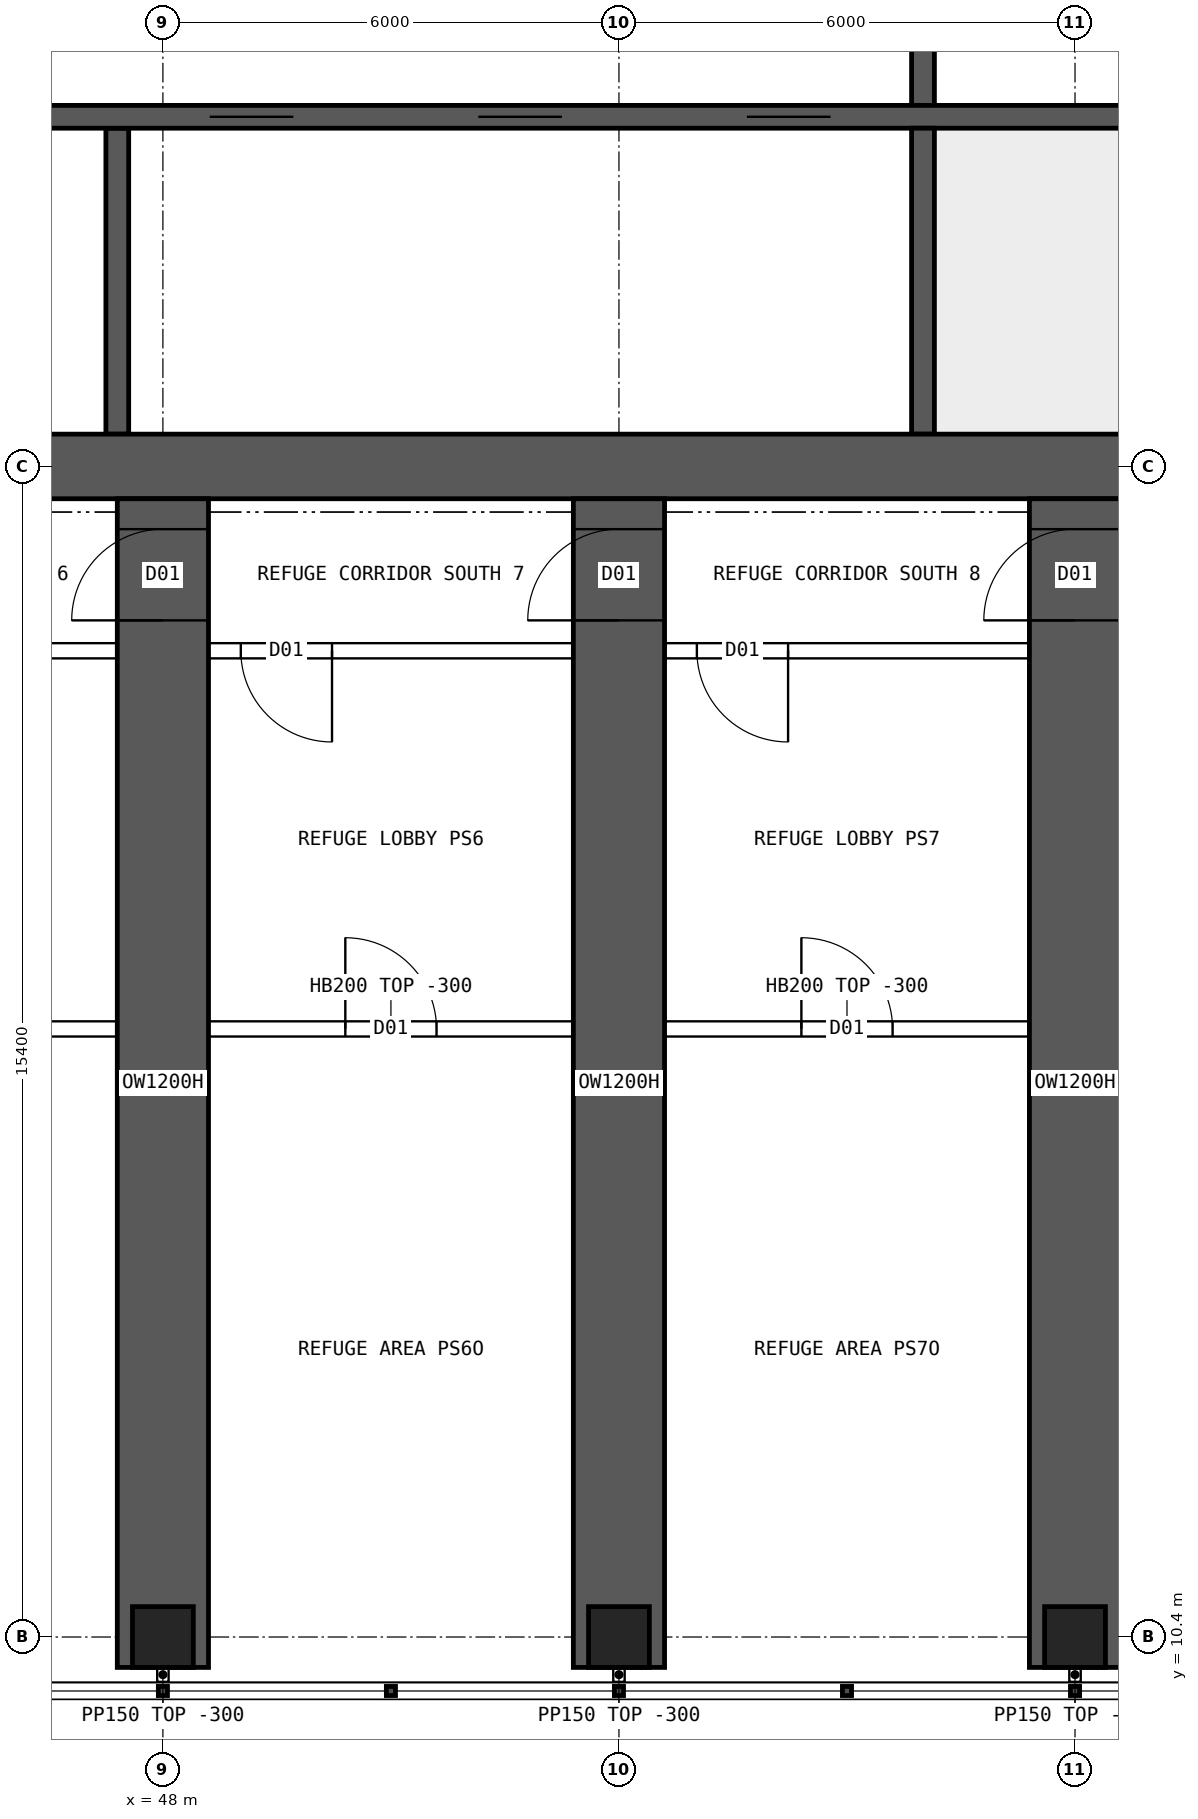
"""IFC4 building model, lengths in metres.
Left out: names, types, materials, properties, quantities, classifications, styles, units other than length and angle.
Written with IfcOpenShell. Run it as: python <this file> out.ifc"""

import sys

from ifc_helpers import new_model, si_unit, direction, frame, frame_2d, origin, origin_2d, place, context, subcontext, project, spatial, rectangle, hollow_rectangle, extrude, element, fill, save


model = new_model("IFC4")
c1 = context("Model", 3, precision=1e-05, world=origin(), true_north=direction((0.0, 1.0)))
c2 = subcontext(c1, "Body", "Model", "MODEL_VIEW")
j1 = project(units=[si_unit("LENGTHUNIT", "METRE"), si_unit("PLANEANGLEUNIT", "RADIAN")], contexts=[c1])
p1 = place(None, origin())
s1 = spatial("IfcSite", under=j1, at=p1, CompositionType="ELEMENT")
p2 = place(p1, origin())
s2 = spatial("IfcBuilding", under=s1, at=p2, CompositionType="ELEMENT")
p3 = place(p2, frame((0.0, 0.0, 201.1)))
s3 = spatial("IfcBuildingStorey", under=s2, at=p3, CompositionType="ELEMENT", Elevation=201.1)
for number, where, z_axis, x_axis in (
    (1, (48.0, 10.4, 0.0), (0.0, 0.0, 1.0), (1.0, 0.0, 0.0)),
    (2, (54.0, 10.4, 0.0), (0.0, 0.0, 1.0), (1.0, 0.0, 0.0)),
    (3, (60.0, 10.4, 0.0), (0.0, 0.0, 1.0), (1.0, 0.0, 0.0)),
):
    element("IfcColumn", number, at=place(p3, frame(where, z_axis=z_axis, x_axis=x_axis)), inside=s3, PredefinedType="COLUMN", context=c2, shape_type="SweptSolid", body=[
        extrude(hollow_rectangle(XDim=0.8, YDim=0.8, WallThickness=0.08, at=origin_2d()), origin(), (0.0, 0.0, 1.0), 7.2),
    ])
p4 = place(p3, frame((18.0, 25.8, 0.0), z_axis=(0.0, 0.0, 1.0), x_axis=(1.0, 0.0, 0.0)))
e4 = element("IfcWall", 4, at=p4, inside=s3, PredefinedType="SHEAR", context=c2, shape_type="SweptSolid", body=[
    extrude(rectangle(XDim=48.0, YDim=0.85, at=frame_2d((24.0, 0.0))), origin(), (0.0, 0.0, 1.0), 7.2),
])
p5 = place(p3, frame((18.425, 30.4, 0.0), z_axis=(0.0, 0.0, 1.0), x_axis=(1.0, 0.0, 0.0)))
e5 = element("IfcWall", 5, at=p5, inside=s3, PredefinedType="SHEAR", context=c2, shape_type="SweptSolid", body=[
    extrude(rectangle(XDim=47.15, YDim=0.3, at=frame_2d((23.575, 0.0))), origin(), (0.0, 0.0, 1.0), 7.2),
])
p6 = place(p5, frame((0.4, 0.0, 0.0)))
e6 = element("IfcOpeningElement", 6, at=p6, cuts=e5, PredefinedType="OPENING", context=c2, shape_type="SweptSolid", body=[
    extrude(rectangle(XDim=1.0, YDim=2.1, at=frame_2d((0.5, 1.05))), frame((0.0, 0.16, 0.0), z_axis=(0.0, -1.0, 0.0), x_axis=(1.0, 0.0, 0.0)), (0.0, 0.0, 1.0), 0.32),
])
p7 = place(p5, frame((45.75, 0.0, 0.0)))
e7 = element("IfcOpeningElement", 7, at=p7, cuts=e5, PredefinedType="OPENING", context=c2, shape_type="SweptSolid", body=[
    extrude(rectangle(XDim=1.0, YDim=2.1, at=frame_2d((0.5, 1.05))), frame((0.0, 0.16, 0.0), z_axis=(0.0, -1.0, 0.0), x_axis=(1.0, 0.0, 0.0)), (0.0, 0.0, 1.0), 0.32),
])
p8 = place(p5, frame((18.9, 0.0, 0.0)))
e8 = element("IfcOpeningElement", 8, at=p8, cuts=e5, PredefinedType="OPENING", context=c2, shape_type="SweptSolid", body=[
    extrude(rectangle(XDim=0.9, YDim=2.1, at=frame_2d((0.45, 1.05))), frame((0.0, 0.16, 0.0), z_axis=(0.0, -1.0, 0.0), x_axis=(1.0, 0.0, 0.0)), (0.0, 0.0, 1.0), 0.32),
])
p9 = place(p5, frame((30.192, 0.0, 0.0)))
e9 = element("IfcOpeningElement", 9, at=p9, cuts=e5, PredefinedType="OPENING", context=c2, shape_type="SweptSolid", body=[
    extrude(rectangle(XDim=1.1, YDim=2.1, at=frame_2d((0.55, 1.05))), frame((0.0, 0.16, 0.0), z_axis=(0.0, -1.0, 0.0), x_axis=(1.0, 0.0, 0.0)), (0.0, 0.0, 1.0), 0.32),
])
p10 = place(p5, frame((33.725, 0.0, 0.0)))
e10 = element("IfcOpeningElement", 10, at=p10, cuts=e5, PredefinedType="OPENING", context=c2, shape_type="SweptSolid", body=[
    extrude(rectangle(XDim=1.1, YDim=2.1, at=frame_2d((0.55, 1.05))), frame((0.0, 0.16, 0.0), z_axis=(0.0, -1.0, 0.0), x_axis=(1.0, 0.0, 0.0)), (0.0, 0.0, 1.0), 0.32),
])
p11 = place(p5, frame((37.258, 0.0, 0.0)))
e11 = element("IfcOpeningElement", 11, at=p11, cuts=e5, PredefinedType="OPENING", context=c2, shape_type="SweptSolid", body=[
    extrude(rectangle(XDim=1.1, YDim=2.1, at=frame_2d((0.55, 1.05))), frame((0.0, 0.16, 0.0), z_axis=(0.0, -1.0, 0.0), x_axis=(1.0, 0.0, 0.0)), (0.0, 0.0, 1.0), 0.32),
])
p12 = place(p3, frame((58.0, 26.225, 0.0), z_axis=(0.0, 0.0, 1.0), x_axis=(0.0, 1.0, 0.0)))
e12 = element("IfcWall", 12, at=p12, inside=s3, PredefinedType="SHEAR", context=c2, shape_type="SweptSolid", body=[
    extrude(rectangle(XDim=4.025, YDim=0.3, at=frame_2d((2.012, 0.0))), origin(), (0.0, 0.0, 1.0), 7.2),
])
p13 = place(p3, frame((58.0, 30.55, 0.0), z_axis=(0.0, 0.0, 1.0), x_axis=(0.0, 1.0, 0.0)))
e13 = element("IfcWall", 13, at=p13, inside=s3, PredefinedType="SHEAR", context=c2, shape_type="SweptSolid", body=[
    extrude(rectangle(XDim=3.9, YDim=0.3, at=frame_2d((1.95, 0.0))), origin(), (0.0, 0.0, 1.0), 7.2),
])
p14 = place(p13, frame((1.4, 0.0, 0.0)))
e14 = element("IfcOpeningElement", 14, at=p14, cuts=e13, PredefinedType="OPENING", context=c2, shape_type="SweptSolid", body=[
    extrude(rectangle(XDim=1.2, YDim=2.1, at=frame_2d((0.6, 1.05))), frame((0.0, 0.16, 0.0), z_axis=(0.0, -1.0, 0.0), x_axis=(1.0, 0.0, 0.0)), (0.0, 0.0, 1.0), 0.32),
])
p15 = place(p3, frame((47.4, 26.225, 0.0), z_axis=(0.0, 0.0, 1.0), x_axis=(0.0, 1.0, 0.0)))
e15 = element("IfcWall", 15, at=p15, inside=s3, PredefinedType="SHEAR", context=c2, shape_type="SweptSolid", body=[
    extrude(rectangle(XDim=4.025, YDim=0.3, at=frame_2d((2.012, 0.0))), origin(), (0.0, 0.0, 1.0), 7.2),
])
p16 = place(p3, frame((48.0, 10.0, 0.0), z_axis=(0.0, 0.0, 1.0), x_axis=(0.0, 1.0, 0.0)))
e16 = element("IfcWall", 16, at=p16, inside=s3, PredefinedType="SHEAR", context=c2, shape_type="SweptSolid", body=[
    extrude(rectangle(XDim=15.375, YDim=1.2, at=frame_2d((7.688, 0.0))), origin(), (0.0, 0.0, 1.0), 7.2),
])
p17 = place(p16, frame((13.775, 0.0, 0.0)))
e17 = element("IfcOpeningElement", 17, at=p17, cuts=e16, PredefinedType="OPENING", context=c2, shape_type="SweptSolid", body=[
    extrude(rectangle(XDim=1.2, YDim=2.1, at=frame_2d((0.6, 1.05))), frame((0.0, 0.61, 0.0), z_axis=(0.0, -1.0, 0.0), x_axis=(1.0, 0.0, 0.0)), (0.0, 0.0, 1.0), 1.22),
])
p18 = place(p3, frame((54.0, 10.0, 0.0), z_axis=(0.0, 0.0, 1.0), x_axis=(0.0, 1.0, 0.0)))
e18 = element("IfcWall", 18, at=p18, inside=s3, PredefinedType="SHEAR", context=c2, shape_type="SweptSolid", body=[
    extrude(rectangle(XDim=15.375, YDim=1.2, at=frame_2d((7.688, 0.0))), origin(), (0.0, 0.0, 1.0), 7.2),
])
p19 = place(p18, frame((13.775, 0.0, 0.0)))
e19 = element("IfcOpeningElement", 19, at=p19, cuts=e18, PredefinedType="OPENING", context=c2, shape_type="SweptSolid", body=[
    extrude(rectangle(XDim=1.2, YDim=2.1, at=frame_2d((0.6, 1.05))), frame((0.0, 0.61, 0.0), z_axis=(0.0, -1.0, 0.0), x_axis=(1.0, 0.0, 0.0)), (0.0, 0.0, 1.0), 1.22),
])
p20 = place(p3, frame((60.0, 10.0, 0.0), z_axis=(0.0, 0.0, 1.0), x_axis=(0.0, 1.0, 0.0)))
e20 = element("IfcWall", 20, at=p20, inside=s3, PredefinedType="SHEAR", context=c2, shape_type="SweptSolid", body=[
    extrude(rectangle(XDim=15.375, YDim=1.2, at=frame_2d((7.688, 0.0))), origin(), (0.0, 0.0, 1.0), 7.2),
])
p21 = place(p20, frame((13.775, 0.0, 0.0)))
e21 = element("IfcOpeningElement", 21, at=p21, cuts=e20, PredefinedType="OPENING", context=c2, shape_type="SweptSolid", body=[
    extrude(rectangle(XDim=1.2, YDim=2.1, at=frame_2d((0.6, 1.05))), frame((0.0, 0.61, 0.0), z_axis=(0.0, -1.0, 0.0), x_axis=(1.0, 0.0, 0.0)), (0.0, 0.0, 1.0), 1.22),
])
p22 = place(p3, frame((68.4, 23.375, 0.0), z_axis=(0.0, 0.0, 1.0), x_axis=(-1.0, 0.0, 0.0)))
e22 = element("IfcWall", 22, at=p22, inside=s3, PredefinedType="SOLIDWALL", context=c2, shape_type="SweptSolid", body=[
    extrude(rectangle(XDim=52.8, YDim=0.2, at=frame_2d((26.4, 0.0))), origin(), (0.0, 0.0, 1.0), 6.9),
])
p23 = place(p22, frame((51.0, 0.0, 0.0)))
e23 = element("IfcOpeningElement", 23, at=p23, cuts=e22, PredefinedType="OPENING", context=c2, shape_type="SweptSolid", body=[
    extrude(rectangle(XDim=1.2, YDim=2.1, at=frame_2d((0.6, 1.05))), frame((0.0, 0.11, 0.0), z_axis=(0.0, -1.0, 0.0), x_axis=(1.0, 0.0, 0.0)), (0.0, 0.0, 1.0), 0.22),
])
p24 = place(p22, frame((48.175, 0.0, 0.0)))
e24 = element("IfcOpeningElement", 24, at=p24, cuts=e22, PredefinedType="OPENING", context=c2, shape_type="SweptSolid", body=[
    extrude(rectangle(XDim=1.2, YDim=2.1, at=frame_2d((0.6, 1.05))), frame((0.0, 0.11, 0.0), z_axis=(0.0, -1.0, 0.0), x_axis=(1.0, 0.0, 0.0)), (0.0, 0.0, 1.0), 0.22),
])
p25 = place(p22, frame((42.175, 0.0, 0.0)))
e25 = element("IfcOpeningElement", 25, at=p25, cuts=e22, PredefinedType="OPENING", context=c2, shape_type="SweptSolid", body=[
    extrude(rectangle(XDim=1.2, YDim=2.1, at=frame_2d((0.6, 1.05))), frame((0.0, 0.11, 0.0), z_axis=(0.0, -1.0, 0.0), x_axis=(1.0, 0.0, 0.0)), (0.0, 0.0, 1.0), 0.22),
])
p26 = place(p22, frame((36.175, 0.0, 0.0)))
e26 = element("IfcOpeningElement", 26, at=p26, cuts=e22, PredefinedType="OPENING", context=c2, shape_type="SweptSolid", body=[
    extrude(rectangle(XDim=1.2, YDim=2.1, at=frame_2d((0.6, 1.05))), frame((0.0, 0.11, 0.0), z_axis=(0.0, -1.0, 0.0), x_axis=(1.0, 0.0, 0.0)), (0.0, 0.0, 1.0), 0.22),
])
p27 = place(p22, frame((30.175, 0.0, 0.0)))
e27 = element("IfcOpeningElement", 27, at=p27, cuts=e22, PredefinedType="OPENING", context=c2, shape_type="SweptSolid", body=[
    extrude(rectangle(XDim=1.2, YDim=2.1, at=frame_2d((0.6, 1.05))), frame((0.0, 0.11, 0.0), z_axis=(0.0, -1.0, 0.0), x_axis=(1.0, 0.0, 0.0)), (0.0, 0.0, 1.0), 0.22),
])
p28 = place(p22, frame((24.175, 0.0, 0.0)))
e28 = element("IfcOpeningElement", 28, at=p28, cuts=e22, PredefinedType="OPENING", context=c2, shape_type="SweptSolid", body=[
    extrude(rectangle(XDim=1.2, YDim=2.1, at=frame_2d((0.6, 1.05))), frame((0.0, 0.11, 0.0), z_axis=(0.0, -1.0, 0.0), x_axis=(1.0, 0.0, 0.0)), (0.0, 0.0, 1.0), 0.22),
])
p29 = place(p22, frame((18.175, 0.0, 0.0)))
e29 = element("IfcOpeningElement", 29, at=p29, cuts=e22, PredefinedType="OPENING", context=c2, shape_type="SweptSolid", body=[
    extrude(rectangle(XDim=1.2, YDim=2.1, at=frame_2d((0.6, 1.05))), frame((0.0, 0.11, 0.0), z_axis=(0.0, -1.0, 0.0), x_axis=(1.0, 0.0, 0.0)), (0.0, 0.0, 1.0), 0.22),
])
p30 = place(p22, frame((12.175, 0.0, 0.0)))
e30 = element("IfcOpeningElement", 30, at=p30, cuts=e22, PredefinedType="OPENING", context=c2, shape_type="SweptSolid", body=[
    extrude(rectangle(XDim=1.2, YDim=2.1, at=frame_2d((0.6, 1.05))), frame((0.0, 0.11, 0.0), z_axis=(0.0, -1.0, 0.0), x_axis=(1.0, 0.0, 0.0)), (0.0, 0.0, 1.0), 0.22),
])
p31 = place(p22, frame((6.175, 0.0, 0.0)))
e31 = element("IfcOpeningElement", 31, at=p31, cuts=e22, PredefinedType="OPENING", context=c2, shape_type="SweptSolid", body=[
    extrude(rectangle(XDim=1.2, YDim=2.1, at=frame_2d((0.6, 1.05))), frame((0.0, 0.11, 0.0), z_axis=(0.0, -1.0, 0.0), x_axis=(1.0, 0.0, 0.0)), (0.0, 0.0, 1.0), 0.22),
])
p32 = place(p22, frame((0.175, 0.0, 0.0)))
e32 = element("IfcOpeningElement", 32, at=p32, cuts=e22, PredefinedType="OPENING", context=c2, shape_type="SweptSolid", body=[
    extrude(rectangle(XDim=1.2, YDim=2.1, at=frame_2d((0.6, 1.05))), frame((0.0, 0.11, 0.0), z_axis=(0.0, -1.0, 0.0), x_axis=(1.0, 0.0, 0.0)), (0.0, 0.0, 1.0), 0.22),
])
p33 = place(p3, frame((42.425, 18.4, 0.0), z_axis=(0.0, 0.0, 1.0), x_axis=(1.0, 0.0, 0.0)))
e33 = element("IfcWall", 33, at=p33, inside=s3, PredefinedType="SOLIDWALL", context=c2, shape_type="SweptSolid", body=[
    extrude(rectangle(XDim=5.15, YDim=0.2, at=frame_2d((2.575, 0.0))), origin(), (0.0, 0.0, 1.0), 6.9),
])
p34 = place(p33, frame((1.975, 0.0, 0.0)))
e34 = element("IfcOpeningElement", 34, at=p34, cuts=e33, PredefinedType="OPENING", context=c2, shape_type="SweptSolid", body=[
    extrude(rectangle(XDim=1.2, YDim=2.1, at=frame_2d((0.6, 1.05))), frame((0.0, 0.11, 0.0), z_axis=(0.0, -1.0, 0.0), x_axis=(1.0, 0.0, 0.0)), (0.0, 0.0, 1.0), 0.22),
])
p35 = place(p3, frame((48.425, 18.4, 0.0), z_axis=(0.0, 0.0, 1.0), x_axis=(1.0, 0.0, 0.0)))
e35 = element("IfcWall", 35, at=p35, inside=s3, PredefinedType="SOLIDWALL", context=c2, shape_type="SweptSolid", body=[
    extrude(rectangle(XDim=5.15, YDim=0.2, at=frame_2d((2.575, 0.0))), origin(), (0.0, 0.0, 1.0), 6.9),
])
p36 = place(p35, frame((1.975, 0.0, 0.0)))
e36 = element("IfcOpeningElement", 36, at=p36, cuts=e35, PredefinedType="OPENING", context=c2, shape_type="SweptSolid", body=[
    extrude(rectangle(XDim=1.2, YDim=2.1, at=frame_2d((0.6, 1.05))), frame((0.0, 0.11, 0.0), z_axis=(0.0, -1.0, 0.0), x_axis=(1.0, 0.0, 0.0)), (0.0, 0.0, 1.0), 0.22),
])
p37 = place(p3, frame((54.425, 18.4, 0.0), z_axis=(0.0, 0.0, 1.0), x_axis=(1.0, 0.0, 0.0)))
e37 = element("IfcWall", 37, at=p37, inside=s3, PredefinedType="SOLIDWALL", context=c2, shape_type="SweptSolid", body=[
    extrude(rectangle(XDim=5.15, YDim=0.2, at=frame_2d((2.575, 0.0))), origin(), (0.0, 0.0, 1.0), 6.9),
])
p38 = place(p37, frame((1.975, 0.0, 0.0)))
e38 = element("IfcOpeningElement", 38, at=p38, cuts=e37, PredefinedType="OPENING", context=c2, shape_type="SweptSolid", body=[
    extrude(rectangle(XDim=1.2, YDim=2.1, at=frame_2d((0.6, 1.05))), frame((0.0, 0.11, 0.0), z_axis=(0.0, -1.0, 0.0), x_axis=(1.0, 0.0, 0.0)), (0.0, 0.0, 1.0), 0.22),
])
p39 = place(p3, frame((60.425, 18.4, 0.0), z_axis=(0.0, 0.0, 1.0), x_axis=(1.0, 0.0, 0.0)))
e39 = element("IfcWall", 39, at=p39, inside=s3, PredefinedType="SOLIDWALL", context=c2, shape_type="SweptSolid", body=[
    extrude(rectangle(XDim=5.15, YDim=0.2, at=frame_2d((2.575, 0.0))), origin(), (0.0, 0.0, 1.0), 6.9),
])
p40 = place(p39, frame((1.975, 0.0, 0.0)))
e40 = element("IfcOpeningElement", 40, at=p40, cuts=e39, PredefinedType="OPENING", context=c2, shape_type="SweptSolid", body=[
    extrude(rectangle(XDim=1.2, YDim=2.1, at=frame_2d((0.6, 1.05))), frame((0.0, 0.11, 0.0), z_axis=(0.0, -1.0, 0.0), x_axis=(1.0, 0.0, 0.0)), (0.0, 0.0, 1.0), 0.22),
])
for number, where, z_axis, x_axis in (
    (41, (48.0, 10.0, 0.0), (0.0, 0.0, 1.0), (0.0, -1.0, 0.0)),
    (42, (54.0, 10.0, 0.0), (0.0, 0.0, 1.0), (0.0, -1.0, 0.0)),
    (43, (60.0, 10.0, 0.0), (0.0, 0.0, 1.0), (0.0, -1.0, 0.0)),
):
    element("IfcWall", number, at=place(p3, frame(where, z_axis=z_axis, x_axis=x_axis)), inside=s3, PredefinedType="PARTITIONING", context=c2, shape_type="SweptSolid", body=[
        extrude(rectangle(XDim=0.19, YDim=0.15, at=frame_2d((0.095, 0.0))), origin(), (0.0, 0.0, 1.0), 6.9),
    ])
p41 = place(p9, origin())
e44 = element("IfcDoor", 44, at=p41, inside=s3, OperationType="DOUBLE_DOOR_SLIDING", PredefinedType="DOOR", context=c2, shape_type="SweptSolid", body=[
    extrude(rectangle(XDim=1.1, YDim=2.1, at=frame_2d((0.55, 1.05))), frame((0.0, 0.025, 0.0), z_axis=(0.0, -1.0, 0.0), x_axis=(1.0, 0.0, 0.0)), (0.0, 0.0, 1.0), 0.05),
])
fill(e9, e44)
p42 = place(p10, origin())
e45 = element("IfcDoor", 45, at=p42, inside=s3, OperationType="DOUBLE_DOOR_SLIDING", PredefinedType="DOOR", context=c2, shape_type="SweptSolid", body=[
    extrude(rectangle(XDim=1.1, YDim=2.1, at=frame_2d((0.55, 1.05))), frame((0.0, 0.025, 0.0), z_axis=(0.0, -1.0, 0.0), x_axis=(1.0, 0.0, 0.0)), (0.0, 0.0, 1.0), 0.05),
])
fill(e10, e45)
p43 = place(p11, origin())
e46 = element("IfcDoor", 46, at=p43, inside=s3, OperationType="DOUBLE_DOOR_SLIDING", PredefinedType="DOOR", context=c2, shape_type="SweptSolid", body=[
    extrude(rectangle(XDim=1.1, YDim=2.1, at=frame_2d((0.55, 1.05))), frame((0.0, 0.025, 0.0), z_axis=(0.0, -1.0, 0.0), x_axis=(1.0, 0.0, 0.0)), (0.0, 0.0, 1.0), 0.05),
])
fill(e11, e46)
p44 = place(p36, origin())
e47 = element("IfcDoor", 47, at=p44, inside=s3, OperationType="SINGLE_SWING_LEFT", PredefinedType="DOOR", context=c2, shape_type="SweptSolid", body=[
    extrude(rectangle(XDim=1.2, YDim=2.1, at=frame_2d((0.6, 1.05))), frame((0.0, 0.025, 0.0), z_axis=(0.0, -1.0, 0.0), x_axis=(1.0, 0.0, 0.0)), (0.0, 0.0, 1.0), 0.05),
])
fill(e36, e47)
p45 = place(p38, origin())
e48 = element("IfcDoor", 48, at=p45, inside=s3, OperationType="SINGLE_SWING_LEFT", PredefinedType="DOOR", context=c2, shape_type="SweptSolid", body=[
    extrude(rectangle(XDim=1.2, YDim=2.1, at=frame_2d((0.6, 1.05))), frame((0.0, 0.025, 0.0), z_axis=(0.0, -1.0, 0.0), x_axis=(1.0, 0.0, 0.0)), (0.0, 0.0, 1.0), 0.05),
])
fill(e38, e48)
p46 = place(p29, origin())
e49 = element("IfcDoor", 49, at=p46, inside=s3, OperationType="SINGLE_SWING_LEFT", PredefinedType="DOOR", context=c2, shape_type="SweptSolid", body=[
    extrude(rectangle(XDim=1.2, YDim=2.1, at=frame_2d((0.6, 1.05))), frame((0.0, 0.025, 0.0), z_axis=(0.0, -1.0, 0.0), x_axis=(1.0, 0.0, 0.0)), (0.0, 0.0, 1.0), 0.05),
])
fill(e29, e49)
p47 = place(p30, origin())
e50 = element("IfcDoor", 50, at=p47, inside=s3, OperationType="SINGLE_SWING_LEFT", PredefinedType="DOOR", context=c2, shape_type="SweptSolid", body=[
    extrude(rectangle(XDim=1.2, YDim=2.1, at=frame_2d((0.6, 1.05))), frame((0.0, 0.025, 0.0), z_axis=(0.0, -1.0, 0.0), x_axis=(1.0, 0.0, 0.0)), (0.0, 0.0, 1.0), 0.05),
])
fill(e30, e50)
p48 = place(p17, origin())
e51 = element("IfcDoor", 51, at=p48, inside=s3, OperationType="SINGLE_SWING_LEFT", PredefinedType="DOOR", context=c2, shape_type="SweptSolid", body=[
    extrude(rectangle(XDim=1.2, YDim=2.1, at=frame_2d((0.6, 1.05))), frame((0.0, 0.025, 0.0), z_axis=(0.0, -1.0, 0.0), x_axis=(1.0, 0.0, 0.0)), (0.0, 0.0, 1.0), 0.05),
])
fill(e17, e51)
p49 = place(p19, origin())
e52 = element("IfcDoor", 52, at=p49, inside=s3, OperationType="SINGLE_SWING_LEFT", PredefinedType="DOOR", context=c2, shape_type="SweptSolid", body=[
    extrude(rectangle(XDim=1.2, YDim=2.1, at=frame_2d((0.6, 1.05))), frame((0.0, 0.025, 0.0), z_axis=(0.0, -1.0, 0.0), x_axis=(1.0, 0.0, 0.0)), (0.0, 0.0, 1.0), 0.05),
])
fill(e19, e52)
p50 = place(p21, origin())
e53 = element("IfcDoor", 53, at=p50, inside=s3, OperationType="SINGLE_SWING_LEFT", PredefinedType="DOOR", context=c2, shape_type="SweptSolid", body=[
    extrude(rectangle(XDim=1.2, YDim=2.1, at=frame_2d((0.6, 1.05))), frame((0.0, 0.025, 0.0), z_axis=(0.0, -1.0, 0.0), x_axis=(1.0, 0.0, 0.0)), (0.0, 0.0, 1.0), 0.05),
])
fill(e21, e53)
save(model, sys.argv[1])
